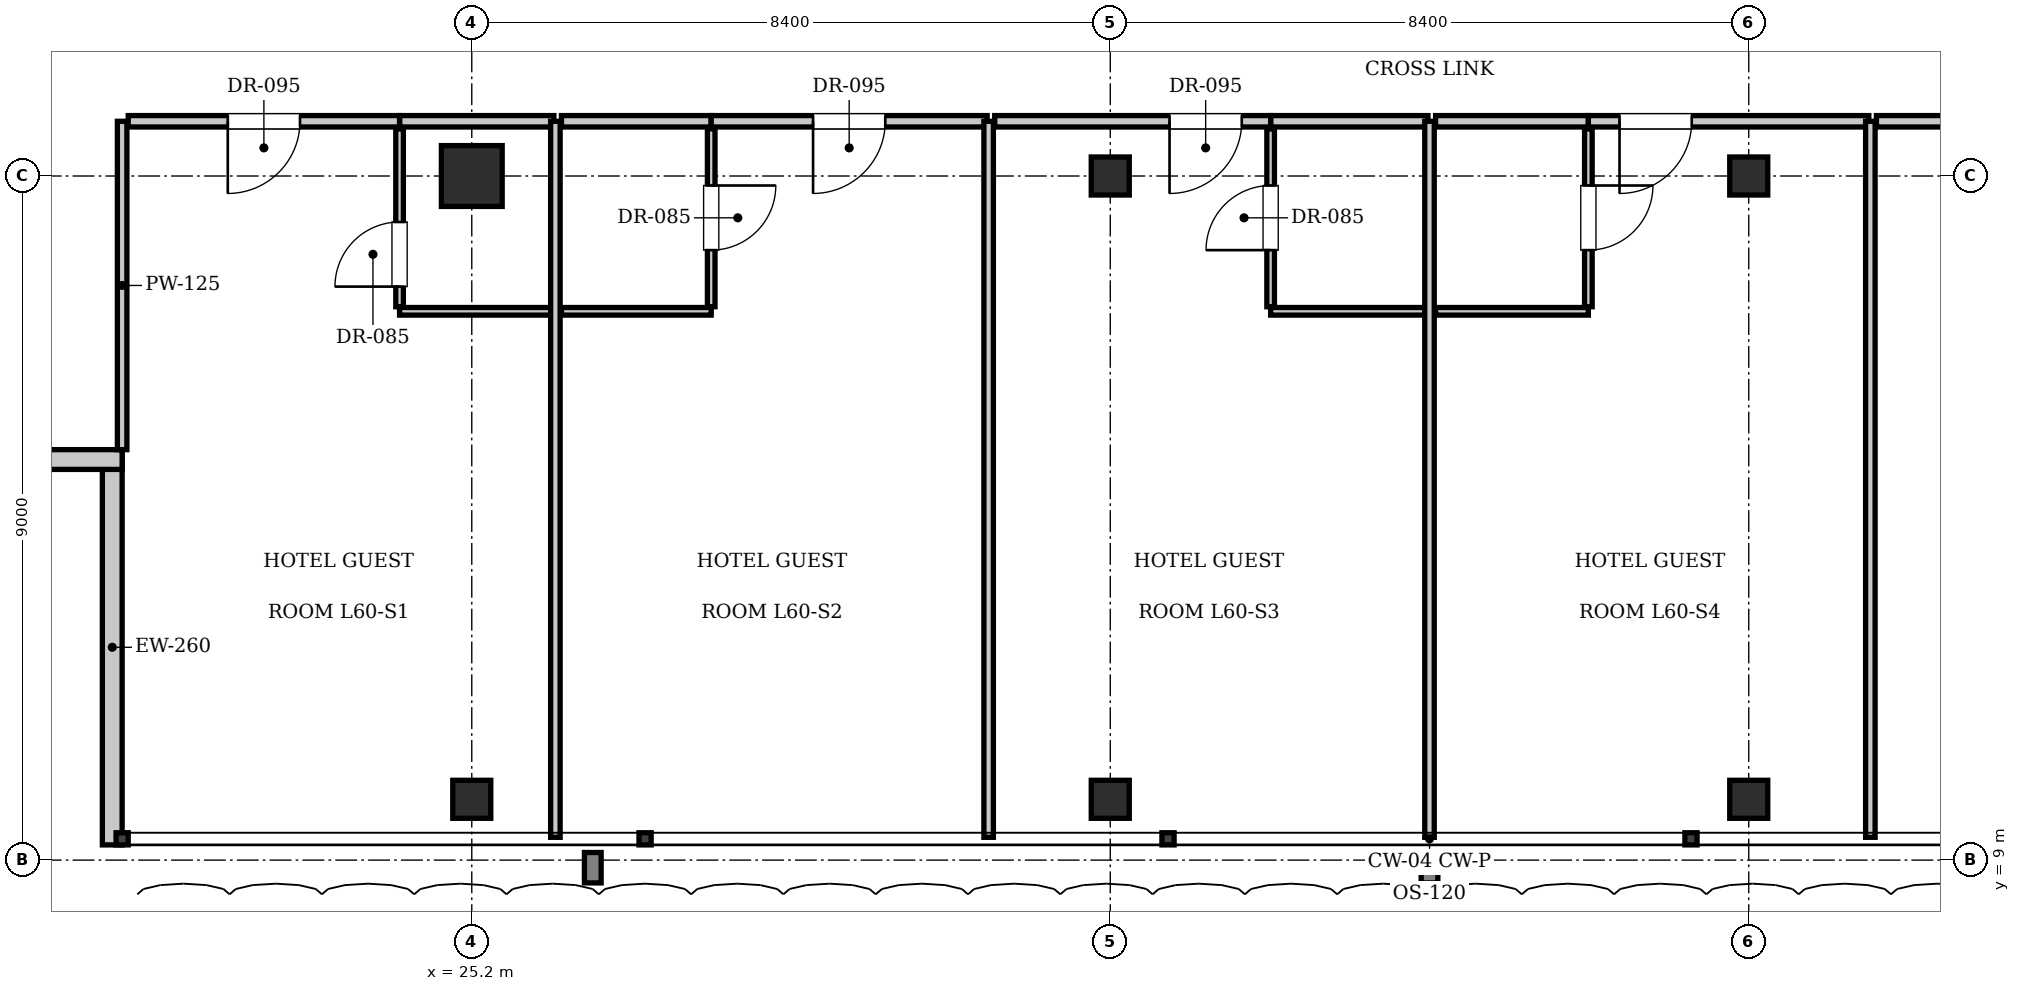
"""IFC4 building model, lengths in metres.
Left out: names, types, materials, properties, quantities, classifications, styles, units other than length and angle.
Written with IfcOpenShell. Run it as: python <this file> out.ifc"""

import sys

from ifc_helpers import new_model, si_unit, direction, frame, frame_2d, origin, origin_2d, place, context, subcontext, project, spatial, rectangle, i_section, extrude, element, fill, save


model = new_model("IFC4")
c1 = context("Model", 3, precision=1e-05, world=origin(), true_north=direction((0.0, 1.0)))
c2 = subcontext(c1, "Body", "Model", "MODEL_VIEW")
j1 = project(units=[si_unit("LENGTHUNIT", "METRE"), si_unit("PLANEANGLEUNIT", "RADIAN")], contexts=[c1])
p1 = place(None, origin())
s1 = spatial("IfcSite", under=j1, at=p1, CompositionType="ELEMENT")
p2 = place(p1, origin())
s2 = spatial("IfcBuilding", under=s1, at=p2, CompositionType="ELEMENT")
p3 = place(p2, frame((0.0, 0.0, 247.1)))
s3 = spatial("IfcBuildingStorey", under=s2, at=p3, CompositionType="ELEMENT", Elevation=247.1)
p4 = place(p3, frame((25.2, 18.0, 0.0), z_axis=(0.0, 0.0, 1.0), x_axis=(1.0, 0.0, 0.0)))
e1 = element("IfcColumn", 1, at=p4, inside=s3, PredefinedType="COLUMN", context=c2, shape_type="SweptSolid", body=[
    extrude(rectangle(XDim=0.8, YDim=0.8, at=origin_2d()), origin(), (0.0, 0.0, 1.0), 3.85),
])
for number, where, z_axis, x_axis in (
    (2, (33.6, 18.0, 0.0), (0.0, 0.0, 1.0), (1.0, 0.0, 0.0)),
    (3, (42.0, 18.0, 0.0), (0.0, 0.0, 1.0), (1.0, 0.0, 0.0)),
    (4, (25.2, 9.8, 0.0), (0.0, 0.0, 1.0), (1.0, 0.0, 0.0)),
    (5, (33.6, 9.8, 0.0), (0.0, 0.0, 1.0), (1.0, 0.0, 0.0)),
    (6, (42.0, 9.8, 0.0), (0.0, 0.0, 1.0), (1.0, 0.0, 0.0)),
):
    element("IfcColumn", number, at=place(p3, frame(where, z_axis=z_axis, x_axis=x_axis)), inside=s3, PredefinedType="COLUMN", context=c2, shape_type="SweptSolid", body=[
        extrude(i_section(OverallWidth=0.5, OverallDepth=0.5, WebThickness=0.022, FlangeThickness=0.032, at=origin_2d()), origin(), (0.0, 0.0, 1.0), 3.85),
    ])
p5 = place(p3, frame((20.47, 9.2, 0.0), z_axis=(0.0, 0.0, 1.0), x_axis=(0.0, 1.0, 0.0)))
e7 = element("IfcWall", 7, at=p5, inside=s3, PredefinedType="SOLIDWALL", context=c2, shape_type="SweptSolid", body=[
    extrude(rectangle(XDim=5.2, YDim=0.26, at=frame_2d((2.6, 0.0))), origin(), (0.0, 0.0, 1.0), 3.61),
])
p6 = place(p3, frame((20.6, 14.27, 0.0), z_axis=(0.0, 0.0, 1.0), x_axis=(-1.0, 0.0, 0.0)))
e8 = element("IfcWall", 8, at=p6, inside=s3, PredefinedType="SOLIDWALL", context=c2, shape_type="SweptSolid", body=[
    extrude(rectangle(XDim=5.2, YDim=0.26, at=frame_2d((2.6, 0.0))), origin(), (0.0, 0.0, 1.0), 3.61),
])
p7 = place(p6, frame((1.6, 0.0, 0.9)))
e9 = element("IfcOpeningElement", 9, at=p7, cuts=e8, PredefinedType="OPENING", context=c2, shape_type="SweptSolid", body=[
    extrude(rectangle(XDim=2.0, YDim=2.2, at=frame_2d((1.0, 1.1))), frame((0.0, 0.14, 0.0), z_axis=(0.0, -1.0, 0.0), x_axis=(1.0, 0.0, 0.0)), (0.0, 0.0, 1.0), 0.28),
])
p8 = place(p3, frame((20.6, 14.4, 0.0), z_axis=(0.0, 0.0, 1.0), x_axis=(0.0, 1.0, 0.0)))
e10 = element("IfcWall", 10, at=p8, inside=s3, PredefinedType="PARTITIONING", context=c2, shape_type="SweptSolid", body=[
    extrude(rectangle(XDim=4.32, YDim=0.125, at=frame_2d((2.16, 0.0))), origin(), (0.0, 0.0, 1.0), 3.61),
])
p9 = place(p3, frame((24.25, 18.72, 0.0), z_axis=(0.0, 0.0, 1.0), x_axis=(1.0, 0.0, 0.0)))
e11 = element("IfcWall", 11, at=p9, inside=s3, PredefinedType="PARTITIONING", context=c2, shape_type="SweptSolid", body=[
    extrude(rectangle(XDim=2.03, YDim=0.15, at=frame_2d((1.015, 0.0))), origin(), (0.0, 0.0, 1.0), 3.61),
])
p10 = place(p3, frame((24.25, 16.22, 0.0), z_axis=(0.0, 0.0, 1.0), x_axis=(1.0, 0.0, 0.0)))
e12 = element("IfcWall", 12, at=p10, inside=s3, PredefinedType="PARTITIONING", context=c2, shape_type="SweptSolid", body=[
    extrude(rectangle(XDim=2.01, YDim=0.1, at=frame_2d((1.005, 0.0))), origin(), (0.0, 0.0, 1.0), 3.61),
])
p11 = place(p3, frame((24.25, 16.28, 0.0), z_axis=(0.0, 0.0, 1.0), x_axis=(0.0, 1.0, 0.0)))
e13 = element("IfcWall", 13, at=p11, inside=s3, PredefinedType="PARTITIONING", context=c2, shape_type="SweptSolid", body=[
    extrude(rectangle(XDim=2.34, YDim=0.1, at=frame_2d((1.17, 0.0))), origin(), (0.0, 0.0, 1.0), 3.61),
])
p12 = place(p11, frame((0.265, 0.0, 0.0)))
e14 = element("IfcOpeningElement", 14, at=p12, cuts=e13, PredefinedType="OPENING", context=c2, shape_type="SweptSolid", body=[
    extrude(rectangle(XDim=0.85, YDim=2.1, at=frame_2d((0.425, 1.05))), frame((0.0, 0.06, 0.0), z_axis=(0.0, -1.0, 0.0), x_axis=(1.0, 0.0, 0.0)), (0.0, 0.0, 1.0), 0.12),
])
p13 = place(p3, frame((20.68, 18.72, 0.0), z_axis=(0.0, 0.0, 1.0), x_axis=(1.0, 0.0, 0.0)))
e15 = element("IfcWall", 15, at=p13, inside=s3, PredefinedType="PARTITIONING", context=c2, shape_type="SweptSolid", body=[
    extrude(rectangle(XDim=3.57, YDim=0.15, at=frame_2d((1.785, 0.0))), origin(), (0.0, 0.0, 1.0), 3.61),
])
p14 = place(p13, frame((1.31, 0.0, 0.0)))
e16 = element("IfcOpeningElement", 16, at=p14, cuts=e15, PredefinedType="OPENING", context=c2, shape_type="SweptSolid", body=[
    extrude(rectangle(XDim=0.95, YDim=2.15, at=frame_2d((0.475, 1.075))), frame((0.0, 0.085, 0.0), z_axis=(0.0, -1.0, 0.0), x_axis=(1.0, 0.0, 0.0)), (0.0, 0.0, 1.0), 0.17),
])
p15 = place(p3, frame((26.3, 9.3, 0.0), z_axis=(0.0, 0.0, 1.0), x_axis=(0.0, 1.0, 0.0)))
e17 = element("IfcWall", 17, at=p15, inside=s3, PredefinedType="PARTITIONING", context=c2, shape_type="SweptSolid", body=[
    extrude(rectangle(XDim=9.42, YDim=0.125, at=frame_2d((4.71, 0.0))), origin(), (0.0, 0.0, 1.0), 3.61),
])
p16 = place(p3, frame((26.38, 18.72, 0.0), z_axis=(0.0, 0.0, 1.0), x_axis=(1.0, 0.0, 0.0)))
e18 = element("IfcWall", 18, at=p16, inside=s3, PredefinedType="PARTITIONING", context=c2, shape_type="SweptSolid", body=[
    extrude(rectangle(XDim=1.97, YDim=0.15, at=frame_2d((0.985, 0.0))), origin(), (0.0, 0.0, 1.0), 3.61),
])
p17 = place(p3, frame((26.38, 16.22, 0.0), z_axis=(0.0, 0.0, 1.0), x_axis=(1.0, 0.0, 0.0)))
e19 = element("IfcWall", 19, at=p17, inside=s3, PredefinedType="PARTITIONING", context=c2, shape_type="SweptSolid", body=[
    extrude(rectangle(XDim=1.97, YDim=0.1, at=frame_2d((0.985, 0.0))), origin(), (0.0, 0.0, 1.0), 3.61),
])
p18 = place(p3, frame((28.35, 16.28, 0.0), z_axis=(0.0, 0.0, 1.0), x_axis=(0.0, 1.0, 0.0)))
e20 = element("IfcWall", 20, at=p18, inside=s3, PredefinedType="PARTITIONING", context=c2, shape_type="SweptSolid", body=[
    extrude(rectangle(XDim=2.34, YDim=0.1, at=frame_2d((1.17, 0.0))), origin(), (0.0, 0.0, 1.0), 3.61),
])
p19 = place(p18, frame((0.745, 0.0, 0.0)))
e21 = element("IfcOpeningElement", 21, at=p19, cuts=e20, PredefinedType="OPENING", context=c2, shape_type="SweptSolid", body=[
    extrude(rectangle(XDim=0.85, YDim=2.1, at=frame_2d((0.425, 1.05))), frame((0.0, 0.06, 0.0), z_axis=(0.0, -1.0, 0.0), x_axis=(1.0, 0.0, 0.0)), (0.0, 0.0, 1.0), 0.12),
])
p20 = place(p3, frame((28.35, 18.72, 0.0), z_axis=(0.0, 0.0, 1.0), x_axis=(1.0, 0.0, 0.0)))
e22 = element("IfcWall", 22, at=p20, inside=s3, PredefinedType="PARTITIONING", context=c2, shape_type="SweptSolid", body=[
    extrude(rectangle(XDim=3.63, YDim=0.15, at=frame_2d((1.815, 0.0))), origin(), (0.0, 0.0, 1.0), 3.61),
])
p21 = place(p20, frame((1.34, 0.0, 0.0)))
e23 = element("IfcOpeningElement", 23, at=p21, cuts=e22, PredefinedType="OPENING", context=c2, shape_type="SweptSolid", body=[
    extrude(rectangle(XDim=0.95, YDim=2.15, at=frame_2d((0.475, 1.075))), frame((0.0, 0.085, 0.0), z_axis=(0.0, -1.0, 0.0), x_axis=(1.0, 0.0, 0.0)), (0.0, 0.0, 1.0), 0.17),
])
p22 = place(p3, frame((32.0, 9.3, 0.0), z_axis=(0.0, 0.0, 1.0), x_axis=(0.0, 1.0, 0.0)))
e24 = element("IfcWall", 24, at=p22, inside=s3, PredefinedType="PARTITIONING", context=c2, shape_type="SweptSolid", body=[
    extrude(rectangle(XDim=9.42, YDim=0.125, at=frame_2d((4.71, 0.0))), origin(), (0.0, 0.0, 1.0), 3.61),
])
p23 = place(p3, frame((35.71, 18.72, 0.0), z_axis=(0.0, 0.0, 1.0), x_axis=(1.0, 0.0, 0.0)))
e25 = element("IfcWall", 25, at=p23, inside=s3, PredefinedType="PARTITIONING", context=c2, shape_type="SweptSolid", body=[
    extrude(rectangle(XDim=2.07, YDim=0.15, at=frame_2d((1.035, 0.0))), origin(), (0.0, 0.0, 1.0), 3.61),
])
p24 = place(p3, frame((35.71, 16.22, 0.0), z_axis=(0.0, 0.0, 1.0), x_axis=(1.0, 0.0, 0.0)))
e26 = element("IfcWall", 26, at=p24, inside=s3, PredefinedType="PARTITIONING", context=c2, shape_type="SweptSolid", body=[
    extrude(rectangle(XDim=2.05, YDim=0.1, at=frame_2d((1.025, 0.0))), origin(), (0.0, 0.0, 1.0), 3.61),
])
p25 = place(p3, frame((35.71, 16.28, 0.0), z_axis=(0.0, 0.0, 1.0), x_axis=(0.0, 1.0, 0.0)))
e27 = element("IfcWall", 27, at=p25, inside=s3, PredefinedType="PARTITIONING", context=c2, shape_type="SweptSolid", body=[
    extrude(rectangle(XDim=2.34, YDim=0.1, at=frame_2d((1.17, 0.0))), origin(), (0.0, 0.0, 1.0), 3.61),
])
p26 = place(p25, frame((0.745, 0.0, 0.0)))
e28 = element("IfcOpeningElement", 28, at=p26, cuts=e27, PredefinedType="OPENING", context=c2, shape_type="SweptSolid", body=[
    extrude(rectangle(XDim=0.85, YDim=2.1, at=frame_2d((0.425, 1.05))), frame((0.0, 0.06, 0.0), z_axis=(0.0, -1.0, 0.0), x_axis=(1.0, 0.0, 0.0)), (0.0, 0.0, 1.0), 0.12),
])
p27 = place(p3, frame((32.08, 18.72, 0.0), z_axis=(0.0, 0.0, 1.0), x_axis=(1.0, 0.0, 0.0)))
e29 = element("IfcWall", 29, at=p27, inside=s3, PredefinedType="PARTITIONING", context=c2, shape_type="SweptSolid", body=[
    extrude(rectangle(XDim=3.63, YDim=0.15, at=frame_2d((1.815, 0.0))), origin(), (0.0, 0.0, 1.0), 3.61),
])
p28 = place(p27, frame((2.3, 0.0, 0.0)))
e30 = element("IfcOpeningElement", 30, at=p28, cuts=e29, PredefinedType="OPENING", context=c2, shape_type="SweptSolid", body=[
    extrude(rectangle(XDim=0.95, YDim=2.15, at=frame_2d((0.475, 1.075))), frame((0.0, 0.085, 0.0), z_axis=(0.0, -1.0, 0.0), x_axis=(1.0, 0.0, 0.0)), (0.0, 0.0, 1.0), 0.17),
])
p29 = place(p3, frame((37.8, 9.3, 0.0), z_axis=(0.0, 0.0, 1.0), x_axis=(0.0, 1.0, 0.0)))
e31 = element("IfcWall", 31, at=p29, inside=s3, PredefinedType="PARTITIONING", context=c2, shape_type="SweptSolid", body=[
    extrude(rectangle(XDim=9.42, YDim=0.125, at=frame_2d((4.71, 0.0))), origin(), (0.0, 0.0, 1.0), 3.344),
])
p30 = place(p3, frame((37.88, 18.72, 0.0), z_axis=(0.0, 0.0, 1.0), x_axis=(1.0, 0.0, 0.0)))
e32 = element("IfcWall", 32, at=p30, inside=s3, PredefinedType="PARTITIONING", context=c2, shape_type="SweptSolid", body=[
    extrude(rectangle(XDim=2.01, YDim=0.15, at=frame_2d((1.005, 0.0))), origin(), (0.0, 0.0, 1.0), 3.61),
])
p31 = place(p3, frame((37.88, 16.22, 0.0), z_axis=(0.0, 0.0, 1.0), x_axis=(1.0, 0.0, 0.0)))
e33 = element("IfcWall", 33, at=p31, inside=s3, PredefinedType="PARTITIONING", context=c2, shape_type="SweptSolid", body=[
    extrude(rectangle(XDim=2.01, YDim=0.1, at=frame_2d((1.005, 0.0))), origin(), (0.0, 0.0, 1.0), 3.61),
])
p32 = place(p3, frame((39.89, 16.28, 0.0), z_axis=(0.0, 0.0, 1.0), x_axis=(0.0, 1.0, 0.0)))
e34 = element("IfcWall", 34, at=p32, inside=s3, PredefinedType="PARTITIONING", context=c2, shape_type="SweptSolid", body=[
    extrude(rectangle(XDim=2.34, YDim=0.1, at=frame_2d((1.17, 0.0))), origin(), (0.0, 0.0, 1.0), 3.61),
])
p33 = place(p32, frame((0.745, 0.0, 0.0)))
e35 = element("IfcOpeningElement", 35, at=p33, cuts=e34, PredefinedType="OPENING", context=c2, shape_type="SweptSolid", body=[
    extrude(rectangle(XDim=0.85, YDim=2.1, at=frame_2d((0.425, 1.05))), frame((0.0, 0.06, 0.0), z_axis=(0.0, -1.0, 0.0), x_axis=(1.0, 0.0, 0.0)), (0.0, 0.0, 1.0), 0.12),
])
p34 = place(p3, frame((39.89, 18.72, 0.0), z_axis=(0.0, 0.0, 1.0), x_axis=(1.0, 0.0, 0.0)))
e36 = element("IfcWall", 36, at=p34, inside=s3, PredefinedType="PARTITIONING", context=c2, shape_type="SweptSolid", body=[
    extrude(rectangle(XDim=3.69, YDim=0.15, at=frame_2d((1.845, 0.0))), origin(), (0.0, 0.0, 1.0), 3.61),
])
p35 = place(p34, frame((0.41, 0.0, 0.0)))
e37 = element("IfcOpeningElement", 37, at=p35, cuts=e36, PredefinedType="OPENING", context=c2, shape_type="SweptSolid", body=[
    extrude(rectangle(XDim=0.95, YDim=2.15, at=frame_2d((0.475, 1.075))), frame((0.0, 0.085, 0.0), z_axis=(0.0, -1.0, 0.0), x_axis=(1.0, 0.0, 0.0)), (0.0, 0.0, 1.0), 0.17),
])
p36 = place(p3, frame((43.6, 9.3, 0.0), z_axis=(0.0, 0.0, 1.0), x_axis=(0.0, 1.0, 0.0)))
e38 = element("IfcWall", 38, at=p36, inside=s3, PredefinedType="PARTITIONING", context=c2, shape_type="SweptSolid", body=[
    extrude(rectangle(XDim=9.42, YDim=0.125, at=frame_2d((4.71, 0.0))), origin(), (0.0, 0.0, 1.0), 3.61),
])
p37 = place(p3, frame((43.68, 18.72, 0.0), z_axis=(0.0, 0.0, 1.0), x_axis=(1.0, 0.0, 0.0)))
e39 = element("IfcWall", 39, at=p37, inside=s3, PredefinedType="PARTITIONING", context=c2, shape_type="SweptSolid", body=[
    extrude(rectangle(XDim=3.57, YDim=0.15, at=frame_2d((1.785, 0.0))), origin(), (0.0, 0.0, 1.0), 3.61),
])
p38 = place(p37, frame((1.31, 0.0, 0.0)))
e40 = element("IfcOpeningElement", 40, at=p38, cuts=e39, PredefinedType="OPENING", context=c2, shape_type="SweptSolid", body=[
    extrude(rectangle(XDim=0.95, YDim=2.15, at=frame_2d((0.475, 1.075))), frame((0.0, 0.085, 0.0), z_axis=(0.0, -1.0, 0.0), x_axis=(1.0, 0.0, 0.0)), (0.0, 0.0, 1.0), 0.17),
])
p39 = place(p12, origin())
e41 = element("IfcDoor", 41, at=p39, inside=s3, OperationType="SINGLE_SWING_LEFT", PredefinedType="DOOR", context=c2, shape_type="SweptSolid", body=[
    extrude(rectangle(XDim=0.85, YDim=2.1, at=frame_2d((0.425, 1.05))), frame((0.0, 0.025, 0.0), z_axis=(0.0, -1.0, 0.0), x_axis=(1.0, 0.0, 0.0)), (0.0, 0.0, 1.0), 0.05),
])
fill(e14, e41)
p40 = place(p14, frame((0.95, 0.0, 0.0), z_axis=(0.0, 0.0, 1.0), x_axis=(-1.0, 0.0, 0.0)))
e42 = element("IfcDoor", 42, at=p40, inside=s3, OperationType="SINGLE_SWING_RIGHT", PredefinedType="DOOR", context=c2, shape_type="SweptSolid", body=[
    extrude(rectangle(XDim=0.95, YDim=2.15, at=frame_2d((0.475, 1.075))), frame((0.0, 0.025, 0.0), z_axis=(0.0, -1.0, 0.0), x_axis=(1.0, 0.0, 0.0)), (0.0, 0.0, 1.0), 0.05),
])
fill(e16, e42)
p41 = place(p19, frame((0.85, 0.0, 0.0), z_axis=(0.0, 0.0, 1.0), x_axis=(-1.0, 0.0, 0.0)))
e43 = element("IfcDoor", 43, at=p41, inside=s3, OperationType="SINGLE_SWING_LEFT", PredefinedType="DOOR", context=c2, shape_type="SweptSolid", body=[
    extrude(rectangle(XDim=0.85, YDim=2.1, at=frame_2d((0.425, 1.05))), frame((0.0, 0.025, 0.0), z_axis=(0.0, -1.0, 0.0), x_axis=(1.0, 0.0, 0.0)), (0.0, 0.0, 1.0), 0.05),
])
fill(e21, e43)
p42 = place(p21, frame((0.95, 0.0, 0.0), z_axis=(0.0, 0.0, 1.0), x_axis=(-1.0, 0.0, 0.0)))
e44 = element("IfcDoor", 44, at=p42, inside=s3, OperationType="SINGLE_SWING_RIGHT", PredefinedType="DOOR", context=c2, shape_type="SweptSolid", body=[
    extrude(rectangle(XDim=0.95, YDim=2.15, at=frame_2d((0.475, 1.075))), frame((0.0, 0.025, 0.0), z_axis=(0.0, -1.0, 0.0), x_axis=(1.0, 0.0, 0.0)), (0.0, 0.0, 1.0), 0.05),
])
fill(e23, e44)
p43 = place(p26, origin())
e45 = element("IfcDoor", 45, at=p43, inside=s3, OperationType="SINGLE_SWING_LEFT", PredefinedType="DOOR", context=c2, shape_type="SweptSolid", body=[
    extrude(rectangle(XDim=0.85, YDim=2.1, at=frame_2d((0.425, 1.05))), frame((0.0, 0.025, 0.0), z_axis=(0.0, -1.0, 0.0), x_axis=(1.0, 0.0, 0.0)), (0.0, 0.0, 1.0), 0.05),
])
fill(e28, e45)
p44 = place(p28, frame((0.95, 0.0, 0.0), z_axis=(0.0, 0.0, 1.0), x_axis=(-1.0, 0.0, 0.0)))
e46 = element("IfcDoor", 46, at=p44, inside=s3, OperationType="SINGLE_SWING_RIGHT", PredefinedType="DOOR", context=c2, shape_type="SweptSolid", body=[
    extrude(rectangle(XDim=0.95, YDim=2.15, at=frame_2d((0.475, 1.075))), frame((0.0, 0.025, 0.0), z_axis=(0.0, -1.0, 0.0), x_axis=(1.0, 0.0, 0.0)), (0.0, 0.0, 1.0), 0.05),
])
fill(e30, e46)
p45 = place(p33, frame((0.85, 0.0, 0.0), z_axis=(0.0, 0.0, 1.0), x_axis=(-1.0, 0.0, 0.0)))
e47 = element("IfcDoor", 47, at=p45, inside=s3, OperationType="SINGLE_SWING_LEFT", PredefinedType="DOOR", context=c2, shape_type="SweptSolid", body=[
    extrude(rectangle(XDim=0.85, YDim=2.1, at=frame_2d((0.425, 1.05))), frame((0.0, 0.025, 0.0), z_axis=(0.0, -1.0, 0.0), x_axis=(1.0, 0.0, 0.0)), (0.0, 0.0, 1.0), 0.05),
])
fill(e35, e47)
p46 = place(p35, frame((0.95, 0.0, 0.0), z_axis=(0.0, 0.0, 1.0), x_axis=(-1.0, 0.0, 0.0)))
e48 = element("IfcDoor", 48, at=p46, inside=s3, OperationType="SINGLE_SWING_RIGHT", PredefinedType="DOOR", context=c2, shape_type="SweptSolid", body=[
    extrude(rectangle(XDim=0.95, YDim=2.15, at=frame_2d((0.475, 1.075))), frame((0.0, 0.025, 0.0), z_axis=(0.0, -1.0, 0.0), x_axis=(1.0, 0.0, 0.0)), (0.0, 0.0, 1.0), 0.05),
])
fill(e37, e48)
save(model, sys.argv[1])
